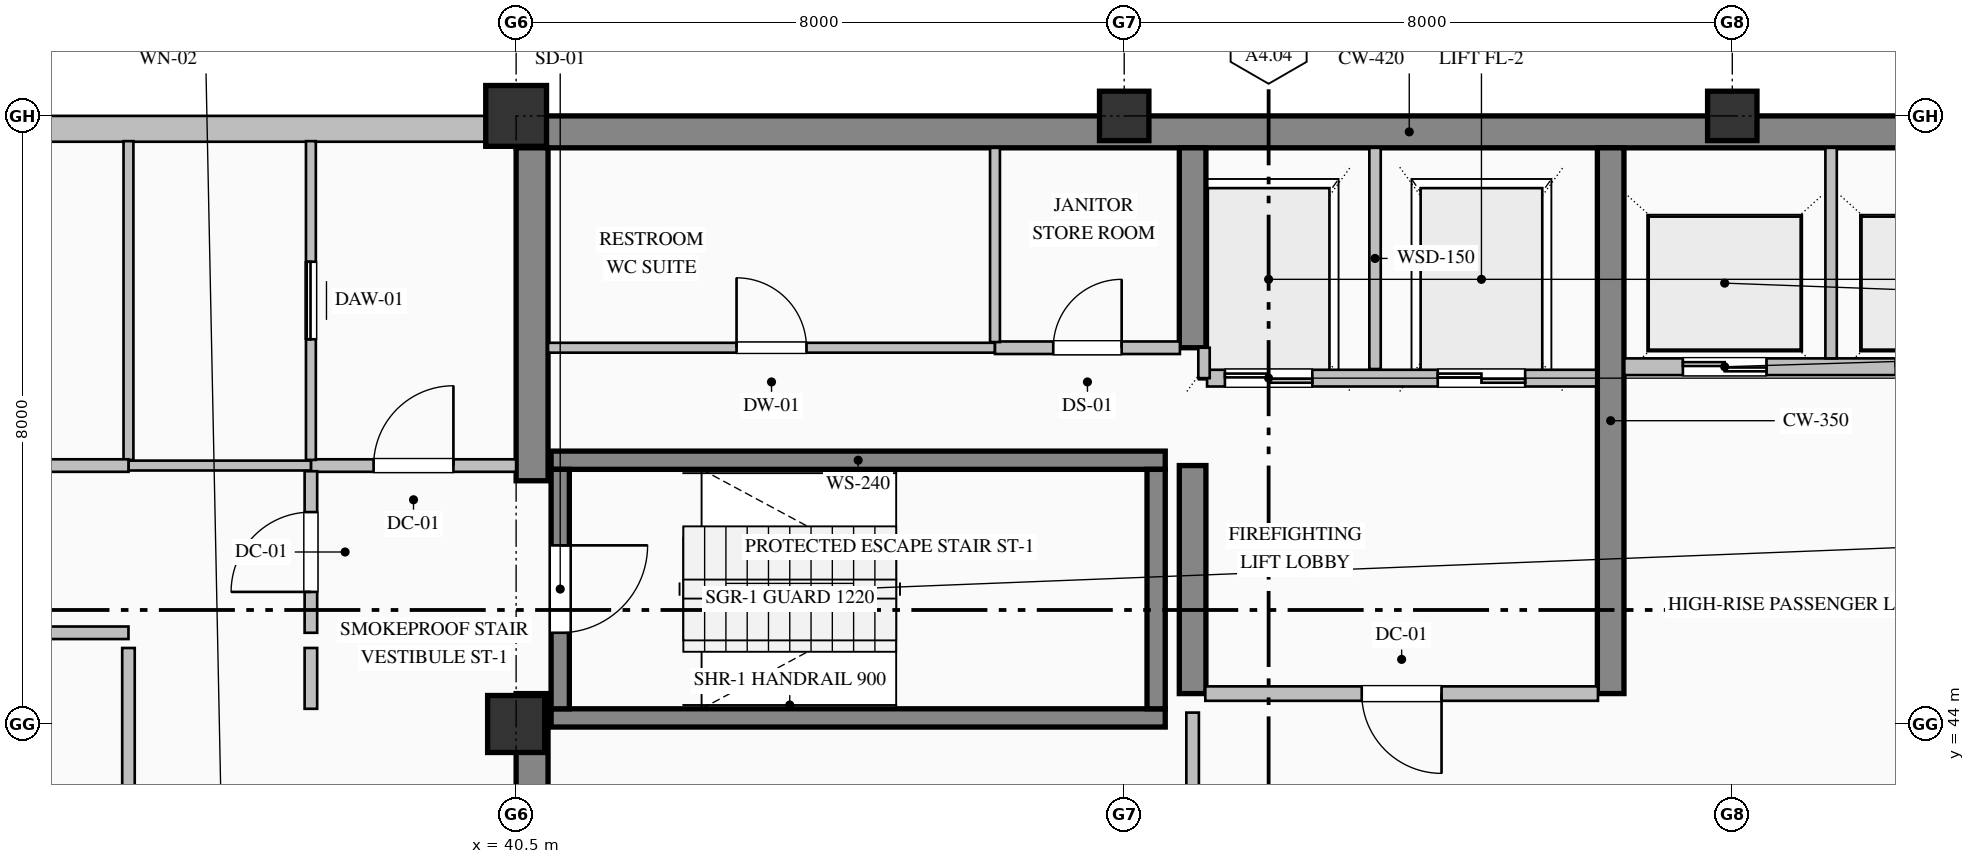
"""IFC4 building model, lengths in metres.
Left out: names, types, materials, properties, quantities, classifications, styles, units other than length and angle.
Written with IfcOpenShell. Run it as: python <this file> out.ifc"""

import sys

from ifc_helpers import new_model, si_unit, direction, frame, frame_2d, origin, origin_2d, place, context, subcontext, project, spatial, rectangle, hollow_rectangle, extrude, element, fill, save


model = new_model("IFC4")
c1 = context("Model", 3, precision=1e-05, world=origin(), true_north=direction((0.0, 1.0)))
c2 = subcontext(c1, "Body", "Model", "MODEL_VIEW")
j1 = project(units=[si_unit("LENGTHUNIT", "METRE"), si_unit("PLANEANGLEUNIT", "RADIAN")], contexts=[c1])
p1 = place(None, origin())
s1 = spatial("IfcSite", under=j1, at=p1, CompositionType="ELEMENT")
p2 = place(p1, origin())
s2 = spatial("IfcBuilding", under=s1, at=p2, CompositionType="ELEMENT")
p3 = place(p2, frame((0.0, 0.0, 339.2)))
s3 = spatial("IfcBuildingStorey", under=s2, at=p3, CompositionType="ELEMENT", Elevation=339.2)
p4 = place(p3, frame((40.5, 51.79, 0.0), z_axis=(0.0, 0.0, 1.0), x_axis=(1.0, 0.0, 0.0)))
e1 = element("IfcWall", 1, at=p4, inside=s3, PredefinedType="SHEAR", context=c2, shape_type="SweptSolid", body=[
    extrude(rectangle(XDim=23.5, YDim=0.42, at=frame_2d((11.75, 0.0))), origin(), (0.0, 0.0, 1.0), 3.785),
])
p5 = place(p3, frame((40.71, 36.42, 0.0), z_axis=(0.0, 0.0, 1.0), x_axis=(0.0, 1.0, 0.0)))
e2 = element("IfcWall", 2, at=p5, inside=s3, PredefinedType="SHEAR", context=c2, shape_type="SweptSolid", body=[
    extrude(rectangle(XDim=7.98, YDim=0.42, at=frame_2d((3.99, 0.0))), origin(), (0.0, 0.0, 1.0), 3.785),
])
p6 = place(p3, frame((40.71, 47.2, 0.0), z_axis=(0.0, 0.0, 1.0), x_axis=(0.0, 1.0, 0.0)))
e3 = element("IfcWall", 3, at=p6, inside=s3, PredefinedType="SHEAR", context=c2, shape_type="SweptSolid", body=[
    extrude(rectangle(XDim=4.38, YDim=0.42, at=frame_2d((2.19, 0.0))), origin(), (0.0, 0.0, 1.0), 3.785),
])
p7 = place(p3, frame((49.4, 44.4, 0.0), z_axis=(0.0, 0.0, 1.0), x_axis=(0.0, 1.0, 0.0)))
e4 = element("IfcWall", 4, at=p7, inside=s3, PredefinedType="SHEAR", context=c2, shape_type="SweptSolid", body=[
    extrude(rectangle(XDim=3.0, YDim=0.35, at=frame_2d((1.5, 0.0))), origin(), (0.0, 0.0, 1.0), 3.785),
])
p8 = place(p3, frame((49.4, 48.95, 0.0), z_axis=(0.0, 0.0, 1.0), x_axis=(0.0, 1.0, 0.0)))
e5 = element("IfcWall", 5, at=p8, inside=s3, PredefinedType="SHEAR", context=c2, shape_type="SweptSolid", body=[
    extrude(rectangle(XDim=2.63, YDim=0.35, at=frame_2d((1.315, 0.0))), origin(), (0.0, 0.0, 1.0), 3.785),
])
p9 = place(p3, frame((54.9, 44.4, 0.0), z_axis=(0.0, 0.0, 1.0), x_axis=(0.0, 1.0, 0.0)))
e6 = element("IfcWall", 6, at=p9, inside=s3, PredefinedType="SHEAR", context=c2, shape_type="SweptSolid", body=[
    extrude(rectangle(XDim=7.18, YDim=0.35, at=frame_2d((3.59, 0.0))), origin(), (0.0, 0.0, 1.0), 3.785),
])
p10 = place(p3, frame((40.5, 44.0, 0.0), z_axis=(0.0, 0.0, 1.0), x_axis=(1.0, 0.0, 0.0)))
e7 = element("IfcColumn", 7, at=p10, inside=s3, PredefinedType="COLUMN", context=c2, shape_type="SweptSolid", body=[
    extrude(rectangle(XDim=0.75, YDim=0.75, at=origin_2d()), origin(), (0.0, 0.0, 1.0), 4.0),
])
p11 = place(p3, frame((40.5, 52.0, 0.0), z_axis=(0.0, 0.0, 1.0), x_axis=(1.0, 0.0, 0.0)))
e8 = element("IfcColumn", 8, at=p11, inside=s3, PredefinedType="COLUMN", context=c2, shape_type="SweptSolid", body=[
    extrude(hollow_rectangle(XDim=0.8, YDim=0.8, WallThickness=0.032, at=origin_2d()), origin(), (0.0, 0.0, 1.0), 4.0),
])
for number, where, z_axis, x_axis in (
    (9, (48.5, 52.0, 0.0), (0.0, 0.0, 1.0), (1.0, 0.0, 0.0)),
    (10, (56.5, 52.0, 0.0), (0.0, 0.0, 1.0), (1.0, 0.0, 0.0)),
):
    element("IfcColumn", number, at=place(p3, frame(where, z_axis=z_axis, x_axis=x_axis)), inside=s3, PredefinedType="COLUMN", context=c2, shape_type="SweptSolid", body=[
        extrude(hollow_rectangle(XDim=0.65, YDim=0.65, WallThickness=0.028, at=origin_2d()), origin(), (0.0, 0.0, 1.0), 4.0),
    ])
p12 = place(p3, frame((20.5, 51.83, 0.0), z_axis=(0.0, 0.0, 1.0), x_axis=(1.0, 0.0, 0.0)))
e11 = element("IfcWall", 11, at=p12, inside=s3, PredefinedType="SOLIDWALL", context=c2, shape_type="SweptSolid", body=[
    extrude(rectangle(XDim=20.02, YDim=0.34, at=frame_2d((10.01, 0.0))), origin(), (0.0, 0.0, 1.0), 3.335),
])
for number, where, z_axis, x_axis in (
    (12, (40.96, 47.47, 0.0), (0.0, 0.0, 1.0), (1.0, 0.0, 0.0)),
    (13, (49.04, 44.08, 0.0), (0.0, 0.0, 1.0), (-1.0, 0.0, 0.0)),
):
    element("IfcWall", number, at=place(p3, frame(where, z_axis=z_axis, x_axis=x_axis)), inside=s3, PredefinedType="SOLIDWALL", context=c2, shape_type="SweptSolid", body=[
        extrude(rectangle(XDim=8.08, YDim=0.24, at=frame_2d((4.04, 0.0))), origin(), (0.0, 0.0, 1.0), 4.0),
    ])
p13 = place(p3, frame((41.08, 47.35, 0.0), z_axis=(0.0, 0.0, 1.0), x_axis=(0.0, -1.0, 0.0)))
e14 = element("IfcWall", 14, at=p13, inside=s3, PredefinedType="SOLIDWALL", context=c2, shape_type="SweptSolid", body=[
    extrude(rectangle(XDim=3.15, YDim=0.24, at=frame_2d((1.575, 0.0))), origin(), (0.0, 0.0, 1.0), 4.0),
])
p14 = place(p13, frame((1.0, 0.0, 0.0)))
e15 = element("IfcOpeningElement", 15, at=p14, cuts=e14, PredefinedType="OPENING", context=c2, shape_type="SweptSolid", body=[
    extrude(rectangle(XDim=1.15, YDim=2.2, at=frame_2d((0.575, 1.1))), frame((0.0, 0.13, 0.0), z_axis=(0.0, -1.0, 0.0), x_axis=(1.0, 0.0, 0.0)), (0.0, 0.0, 1.0), 0.26),
])
p15 = place(p3, frame((48.92, 44.2, 0.0), z_axis=(0.0, 0.0, 1.0), x_axis=(0.0, 1.0, 0.0)))
e16 = element("IfcWall", 16, at=p15, inside=s3, PredefinedType="SOLIDWALL", context=c2, shape_type="SweptSolid", body=[
    extrude(rectangle(XDim=3.15, YDim=0.24, at=frame_2d((1.575, 0.0))), origin(), (0.0, 0.0, 1.0), 4.0),
])
p16 = place(p3, frame((54.71, 48.55, 0.0), z_axis=(0.0, 0.0, 1.0), x_axis=(-1.0, 0.0, 0.0)))
e17 = element("IfcWall", 17, at=p16, inside=s3, PredefinedType="PARTITIONING", context=c2, shape_type="SweptSolid", body=[
    extrude(rectangle(XDim=5.12, YDim=0.22, at=frame_2d((2.56, 0.0))), origin(), (0.0, 0.0, 1.0), 3.785),
])
p17 = place(p16, frame((3.735, 0.0, 0.0)))
e18 = element("IfcOpeningElement", 18, at=p17, cuts=e17, PredefinedType="OPENING", context=c2, shape_type="SweptSolid", body=[
    extrude(rectangle(XDim=1.15, YDim=2.2, at=frame_2d((0.575, 1.1))), frame((0.0, 0.12, 0.0), z_axis=(0.0, -1.0, 0.0), x_axis=(1.0, 0.0, 0.0)), (0.0, 0.0, 1.0), 0.24),
])
p18 = place(p16, frame((0.935, 0.0, 0.0)))
e19 = element("IfcOpeningElement", 19, at=p18, cuts=e17, PredefinedType="OPENING", context=c2, shape_type="SweptSolid", body=[
    extrude(rectangle(XDim=1.15, YDim=2.2, at=frame_2d((0.575, 1.1))), frame((0.0, 0.12, 0.0), z_axis=(0.0, -1.0, 0.0), x_axis=(1.0, 0.0, 0.0)), (0.0, 0.0, 1.0), 0.24),
])
p19 = place(p3, frame((51.8, 48.67, 0.0), z_axis=(0.0, 0.0, 1.0), x_axis=(0.0, 1.0, 0.0)))
e20 = element("IfcWall", 20, at=p19, inside=s3, PredefinedType="PARTITIONING", context=c2, shape_type="SweptSolid", body=[
    extrude(rectangle(XDim=2.91, YDim=0.15, at=frame_2d((1.455, 0.0))), origin(), (0.0, 0.0, 1.0), 3.785),
])
p20 = place(p3, frame((49.55, 48.55, 0.0), z_axis=(0.0, 0.0, 1.0), x_axis=(0.0, 1.0, 0.0)))
e21 = element("IfcWall", 21, at=p20, inside=s3, PredefinedType="PARTITIONING", context=c2, shape_type="SweptSolid", body=[
    extrude(rectangle(XDim=0.4, YDim=0.15, at=frame_2d((0.2, 0.0))), origin(), (0.0, 0.0, 1.0), 3.785),
])
p21 = place(p3, frame((63.32, 48.7, 0.0), z_axis=(0.0, 0.0, 1.0), x_axis=(-1.0, 0.0, 0.0)))
e22 = element("IfcWall", 22, at=p21, inside=s3, PredefinedType="PARTITIONING", context=c2, shape_type="SweptSolid", body=[
    extrude(rectangle(XDim=8.24, YDim=0.22, at=frame_2d((4.12, 0.0))), origin(), (0.0, 0.0, 1.0), 3.785),
])
p22 = place(p21, frame((6.37, 0.0, 0.0)))
e23 = element("IfcOpeningElement", 23, at=p22, cuts=e22, PredefinedType="OPENING", context=c2, shape_type="SweptSolid", body=[
    extrude(rectangle(XDim=1.1, YDim=2.2, at=frame_2d((0.55, 1.1))), frame((0.0, 0.12, 0.0), z_axis=(0.0, -1.0, 0.0), x_axis=(1.0, 0.0, 0.0)), (0.0, 0.0, 1.0), 0.24),
])
p23 = place(p21, frame((3.57, 0.0, 0.0)))
e24 = element("IfcOpeningElement", 24, at=p23, cuts=e22, PredefinedType="OPENING", context=c2, shape_type="SweptSolid", body=[
    extrude(rectangle(XDim=1.1, YDim=2.2, at=frame_2d((0.55, 1.1))), frame((0.0, 0.12, 0.0), z_axis=(0.0, -1.0, 0.0), x_axis=(1.0, 0.0, 0.0)), (0.0, 0.0, 1.0), 0.24),
])
p24 = place(p21, frame((0.77, 0.0, 0.0)))
e25 = element("IfcOpeningElement", 25, at=p24, cuts=e22, PredefinedType="OPENING", context=c2, shape_type="SweptSolid", body=[
    extrude(rectangle(XDim=1.1, YDim=2.2, at=frame_2d((0.55, 1.1))), frame((0.0, 0.12, 0.0), z_axis=(0.0, -1.0, 0.0), x_axis=(1.0, 0.0, 0.0)), (0.0, 0.0, 1.0), 0.24),
])
p25 = place(p3, frame((57.8, 48.81, 0.0), z_axis=(0.0, 0.0, 1.0), x_axis=(0.0, 1.0, 0.0)))
e26 = element("IfcWall", 26, at=p25, inside=s3, PredefinedType="PARTITIONING", context=c2, shape_type="SweptSolid", body=[
    extrude(rectangle(XDim=2.77, YDim=0.15, at=frame_2d((1.385, 0.0))), origin(), (0.0, 0.0, 1.0), 3.785),
])
p26 = place(p3, frame((37.8, 47.4, 0.0), z_axis=(0.0, 0.0, 1.0), x_axis=(1.0, 0.0, 0.0)))
e27 = element("IfcWall", 27, at=p26, inside=s3, PredefinedType="PARTITIONING", context=c2, shape_type="SweptSolid", body=[
    extrude(rectangle(XDim=2.7, YDim=0.165, at=frame_2d((1.35, 0.0))), origin(), (0.0, 0.0, 1.0), 3.785),
])
p27 = place(p26, frame((0.825, 0.0, 0.0)))
e28 = element("IfcOpeningElement", 28, at=p27, cuts=e27, PredefinedType="OPENING", context=c2, shape_type="SweptSolid", body=[
    extrude(rectangle(XDim=1.05, YDim=2.15, at=frame_2d((0.525, 1.075))), frame((0.0, 0.093, 0.0), z_axis=(0.0, -1.0, 0.0), x_axis=(1.0, 0.0, 0.0)), (0.0, 0.0, 1.0), 0.185),
])
p28 = place(p3, frame((37.8, 45.2, 0.0), z_axis=(0.0, 0.0, 1.0), x_axis=(0.0, 1.0, 0.0)))
e29 = element("IfcWall", 29, at=p28, inside=s3, PredefinedType="PARTITIONING", context=c2, shape_type="SweptSolid", body=[
    extrude(rectangle(XDim=2.125, YDim=0.165, at=frame_2d((1.063, 0.0))), origin(), (0.0, 0.0, 1.0), 3.785),
])
p29 = place(p28, frame((0.538, 0.0, 0.0)))
e30 = element("IfcOpeningElement", 30, at=p29, cuts=e29, PredefinedType="OPENING", context=c2, shape_type="SweptSolid", body=[
    extrude(rectangle(XDim=1.05, YDim=2.15, at=frame_2d((0.525, 1.075))), frame((0.0, 0.093, 0.0), z_axis=(0.0, -1.0, 0.0), x_axis=(1.0, 0.0, 0.0)), (0.0, 0.0, 1.0), 0.185),
])
p30 = place(p3, frame((37.8, 44.2, 0.0), z_axis=(0.0, 0.0, 1.0), x_axis=(0.0, 1.0, 0.0)))
e31 = element("IfcWall", 31, at=p30, inside=s3, PredefinedType="PARTITIONING", context=c2, shape_type="SweptSolid", body=[
    extrude(rectangle(XDim=0.8, YDim=0.165, at=frame_2d((0.4, 0.0))), origin(), (0.0, 0.0, 1.0), 3.785),
])
p31 = place(p3, frame((37.8, 47.475, 0.0), z_axis=(0.0, 0.0, 1.0), x_axis=(0.0, 1.0, 0.0)))
e32 = element("IfcWall", 32, at=p31, inside=s3, PredefinedType="PARTITIONING", context=c2, shape_type="SweptSolid", body=[
    extrude(rectangle(XDim=4.193, YDim=0.13, at=frame_2d((2.097, 0.0))), origin(), (0.0, 0.0, 1.0), 3.785),
])
p32 = place(p31, frame((1.587, 0.0, 0.0)))
e33 = element("IfcOpeningElement", 33, at=p32, cuts=e32, PredefinedType="OPENING", context=c2, shape_type="SweptSolid", body=[
    extrude(rectangle(XDim=1.02, YDim=2.15, at=frame_2d((0.51, 1.075))), frame((0.0, 0.075, 0.0), z_axis=(0.0, -1.0, 0.0), x_axis=(1.0, 0.0, 0.0)), (0.0, 0.0, 1.0), 0.15),
])
p33 = place(p3, frame((37.8, 47.4, 0.0), z_axis=(0.0, 0.0, 1.0), x_axis=(-1.0, 0.0, 0.0)))
e34 = element("IfcWall", 34, at=p33, inside=s3, PredefinedType="PARTITIONING", context=c2, shape_type="SweptSolid", body=[
    extrude(rectangle(XDim=2.4, YDim=0.13, at=frame_2d((1.2, 0.0))), origin(), (0.0, 0.0, 1.0), 3.785),
])
p34 = place(p3, frame((35.4, 47.475, 0.0), z_axis=(0.0, 0.0, 1.0), x_axis=(0.0, 1.0, 0.0)))
e35 = element("IfcWall", 35, at=p34, inside=s3, PredefinedType="PARTITIONING", context=c2, shape_type="SweptSolid", body=[
    extrude(rectangle(XDim=4.193, YDim=0.13, at=frame_2d((2.097, 0.0))), origin(), (0.0, 0.0, 1.0), 3.785),
])
p35 = place(p3, frame((40.92, 48.95, 0.0), z_axis=(0.0, 0.0, 1.0), x_axis=(1.0, 0.0, 0.0)))
e36 = element("IfcWall", 36, at=p35, inside=s3, PredefinedType="PARTITIONING", context=c2, shape_type="SweptSolid", body=[
    extrude(rectangle(XDim=5.88, YDim=0.13, at=frame_2d((2.94, 0.0))), origin(), (0.0, 0.0, 1.0), 3.785),
])
p36 = place(p35, frame((2.48, 0.0, 0.0)))
e37 = element("IfcOpeningElement", 37, at=p36, cuts=e36, PredefinedType="OPENING", context=c2, shape_type="SweptSolid", body=[
    extrude(rectangle(XDim=0.92, YDim=2.15, at=frame_2d((0.46, 1.075))), frame((0.0, 0.075, 0.0), z_axis=(0.0, -1.0, 0.0), x_axis=(1.0, 0.0, 0.0)), (0.0, 0.0, 1.0), 0.15),
])
p37 = place(p3, frame((46.8, 48.95, 0.0), z_axis=(0.0, 0.0, 1.0), x_axis=(1.0, 0.0, 0.0)))
e38 = element("IfcWall", 38, at=p37, inside=s3, PredefinedType="PARTITIONING", context=c2, shape_type="SweptSolid", body=[
    extrude(rectangle(XDim=2.433, YDim=0.165, at=frame_2d((1.216, 0.0))), origin(), (0.0, 0.0, 1.0), 3.785),
])
p38 = place(p37, frame((0.767, 0.0, 0.0)))
e39 = element("IfcOpeningElement", 39, at=p38, cuts=e38, PredefinedType="OPENING", context=c2, shape_type="SweptSolid", body=[
    extrude(rectangle(XDim=0.9, YDim=2.15, at=frame_2d((0.45, 1.075))), frame((0.0, 0.093, 0.0), z_axis=(0.0, -1.0, 0.0), x_axis=(1.0, 0.0, 0.0)), (0.0, 0.0, 1.0), 0.185),
])
p39 = place(p3, frame((54.733, 44.4, 0.0), z_axis=(0.0, 0.0, 1.0), x_axis=(-1.0, 0.0, 0.0)))
e40 = element("IfcWall", 40, at=p39, inside=s3, PredefinedType="PARTITIONING", context=c2, shape_type="SweptSolid", body=[
    extrude(rectangle(XDim=5.166, YDim=0.19, at=frame_2d((2.583, 0.0))), origin(), (0.0, 0.0, 1.0), 3.785),
])
p40 = place(p39, frame((2.058, 0.0, 0.0)))
e41 = element("IfcOpeningElement", 41, at=p40, cuts=e40, PredefinedType="OPENING", context=c2, shape_type="SweptSolid", body=[
    extrude(rectangle(XDim=1.05, YDim=2.15, at=frame_2d((0.525, 1.075))), frame((0.0, 0.105, 0.0), z_axis=(0.0, -1.0, 0.0), x_axis=(1.0, 0.0, 0.0)), (0.0, 0.0, 1.0), 0.21),
])
p41 = place(p3, frame((49.4, 36.42, 0.0), z_axis=(0.0, 0.0, 1.0), x_axis=(0.0, 1.0, 0.0)))
e42 = element("IfcWall", 42, at=p41, inside=s3, PredefinedType="PARTITIONING", context=c2, shape_type="SweptSolid", body=[
    extrude(rectangle(XDim=7.73, YDim=0.165, at=frame_2d((3.865, 0.0))), origin(), (0.0, 0.0, 1.0), 3.027),
])
p42 = place(p41, frame((3.365, 0.0, 0.0)))
e43 = element("IfcOpeningElement", 43, at=p42, cuts=e42, PredefinedType="OPENING", context=c2, shape_type="SweptSolid", body=[
    extrude(rectangle(XDim=1.0, YDim=2.15, at=frame_2d((0.5, 1.075))), frame((0.0, 0.093, 0.0), z_axis=(0.0, -1.0, 0.0), x_axis=(1.0, 0.0, 0.0)), (0.0, 0.0, 1.0), 0.185),
])
p43 = place(p3, frame((46.8, 51.58, 0.0), z_axis=(0.0, 0.0, 1.0), x_axis=(0.0, -1.0, 0.0)))
e44 = element("IfcWall", 44, at=p43, inside=s3, PredefinedType="PARTITIONING", context=c2, shape_type="SweptSolid", body=[
    extrude(rectangle(XDim=2.556, YDim=0.13, at=frame_2d((1.278, 0.0))), origin(), (0.0, 0.0, 1.0), 3.785),
])
p44 = place(p3, frame((27.5, 47.4, 0.0), z_axis=(0.0, 0.0, 1.0), x_axis=(1.0, 0.0, 0.0)))
e45 = element("IfcWall", 45, at=p44, inside=s3, PredefinedType="PARTITIONING", context=c2, shape_type="SweptSolid", body=[
    extrude(rectangle(XDim=7.9, YDim=0.165, at=frame_2d((3.95, 0.0))), origin(), (0.0, 0.0, 1.0), 3.785),
])
p45 = place(p44, frame((3.45, 0.0, 0.0)))
e46 = element("IfcOpeningElement", 46, at=p45, cuts=e45, PredefinedType="OPENING", context=c2, shape_type="SweptSolid", body=[
    extrude(rectangle(XDim=1.0, YDim=2.15, at=frame_2d((0.5, 1.075))), frame((0.0, 0.093, 0.0), z_axis=(0.0, -1.0, 0.0), x_axis=(1.0, 0.0, 0.0)), (0.0, 0.0, 1.0), 0.185),
])
p46 = place(p3, frame((35.4, 45.2, 0.0), z_axis=(0.0, 0.0, 1.0), x_axis=(-1.0, 0.0, 0.0)))
e47 = element("IfcWall", 47, at=p46, inside=s3, PredefinedType="PARTITIONING", context=c2, shape_type="SweptSolid", body=[
    extrude(rectangle(XDim=9.4, YDim=0.165, at=frame_2d((4.7, 0.0))), origin(), (0.0, 0.0, 1.0), 3.785),
])
p47 = place(p46, frame((4.2, 0.0, 0.0)))
e48 = element("IfcOpeningElement", 48, at=p47, cuts=e47, PredefinedType="OPENING", context=c2, shape_type="SweptSolid", body=[
    extrude(rectangle(XDim=1.0, YDim=2.15, at=frame_2d((0.5, 1.075))), frame((0.0, 0.093, 0.0), z_axis=(0.0, -1.0, 0.0), x_axis=(1.0, 0.0, 0.0)), (0.0, 0.0, 1.0), 0.185),
])
p48 = place(p3, frame((35.4, 40.057, 0.0), z_axis=(0.0, 0.0, 1.0), x_axis=(0.0, 1.0, 0.0)))
e49 = element("IfcWall", 49, at=p48, inside=s3, PredefinedType="PARTITIONING", context=c2, shape_type="SweptSolid", body=[
    extrude(rectangle(XDim=4.943, YDim=0.165, at=frame_2d((2.472, 0.0))), origin(), (0.0, 0.0, 1.0), 3.785),
])
p49 = place(p14, origin())
e50 = element("IfcDoor", 50, at=p49, inside=s3, OperationType="SINGLE_SWING_LEFT", PredefinedType="DOOR", context=c2, shape_type="SweptSolid", body=[
    extrude(rectangle(XDim=1.15, YDim=2.2, at=frame_2d((0.575, 1.1))), frame((0.0, 0.025, 0.0), z_axis=(0.0, -1.0, 0.0), x_axis=(1.0, 0.0, 0.0)), (0.0, 0.0, 1.0), 0.05),
])
fill(e15, e50)
p50 = place(p17, origin())
e51 = element("IfcDoor", 51, at=p50, inside=s3, OperationType="DOUBLE_DOOR_SLIDING", PredefinedType="DOOR", context=c2, shape_type="SweptSolid", body=[
    extrude(rectangle(XDim=1.15, YDim=2.2, at=frame_2d((0.575, 1.1))), frame((0.0, 0.025, 0.0), z_axis=(0.0, -1.0, 0.0), x_axis=(1.0, 0.0, 0.0)), (0.0, 0.0, 1.0), 0.05),
])
fill(e18, e51)
p51 = place(p18, origin())
e52 = element("IfcDoor", 52, at=p51, inside=s3, OperationType="DOUBLE_DOOR_SLIDING", PredefinedType="DOOR", context=c2, shape_type="SweptSolid", body=[
    extrude(rectangle(XDim=1.15, YDim=2.2, at=frame_2d((0.575, 1.1))), frame((0.0, 0.025, 0.0), z_axis=(0.0, -1.0, 0.0), x_axis=(1.0, 0.0, 0.0)), (0.0, 0.0, 1.0), 0.05),
])
fill(e19, e52)
p52 = place(p22, origin())
e53 = element("IfcDoor", 53, at=p52, inside=s3, OperationType="DOUBLE_DOOR_SLIDING", PredefinedType="DOOR", context=c2, shape_type="SweptSolid", body=[
    extrude(rectangle(XDim=1.1, YDim=2.2, at=frame_2d((0.55, 1.1))), frame((0.0, 0.025, 0.0), z_axis=(0.0, -1.0, 0.0), x_axis=(1.0, 0.0, 0.0)), (0.0, 0.0, 1.0), 0.05),
])
fill(e23, e53)
p53 = place(p40, origin())
e54 = element("IfcDoor", 54, at=p53, inside=s3, OperationType="SINGLE_SWING_LEFT", PredefinedType="DOOR", context=c2, shape_type="SweptSolid", body=[
    extrude(rectangle(XDim=1.05, YDim=2.15, at=frame_2d((0.525, 1.075))), frame((0.0, 0.025, 0.0), z_axis=(0.0, -1.0, 0.0), x_axis=(1.0, 0.0, 0.0)), (0.0, 0.0, 1.0), 0.05),
])
fill(e41, e54)
p54 = place(p27, origin())
e55 = element("IfcDoor", 55, at=p54, inside=s3, OperationType="SINGLE_SWING_RIGHT", PredefinedType="DOOR", context=c2, shape_type="SweptSolid", body=[
    extrude(rectangle(XDim=1.05, YDim=2.15, at=frame_2d((0.525, 1.075))), frame((0.0, 0.025, 0.0), z_axis=(0.0, -1.0, 0.0), x_axis=(1.0, 0.0, 0.0)), (0.0, 0.0, 1.0), 0.05),
])
fill(e28, e55)
p55 = place(p29, origin())
e56 = element("IfcDoor", 56, at=p55, inside=s3, OperationType="SINGLE_SWING_LEFT", PredefinedType="DOOR", context=c2, shape_type="SweptSolid", body=[
    extrude(rectangle(XDim=1.05, YDim=2.15, at=frame_2d((0.525, 1.075))), frame((0.0, 0.025, 0.0), z_axis=(0.0, -1.0, 0.0), x_axis=(1.0, 0.0, 0.0)), (0.0, 0.0, 1.0), 0.05),
])
fill(e30, e56)
p56 = place(p32, origin())
e57 = element("IfcDoor", 57, at=p56, inside=s3, OperationType="SLIDING_TO_LEFT", PredefinedType="DOOR", context=c2, shape_type="SweptSolid", body=[
    extrude(rectangle(XDim=1.02, YDim=2.15, at=frame_2d((0.51, 1.075))), frame((0.0, 0.025, 0.0), z_axis=(0.0, -1.0, 0.0), x_axis=(1.0, 0.0, 0.0)), (0.0, 0.0, 1.0), 0.05),
])
fill(e33, e57)
p57 = place(p36, origin())
e58 = element("IfcDoor", 58, at=p57, inside=s3, OperationType="SINGLE_SWING_LEFT", PredefinedType="DOOR", context=c2, shape_type="SweptSolid", body=[
    extrude(rectangle(XDim=0.92, YDim=2.15, at=frame_2d((0.46, 1.075))), frame((0.0, 0.025, 0.0), z_axis=(0.0, -1.0, 0.0), x_axis=(1.0, 0.0, 0.0)), (0.0, 0.0, 1.0), 0.05),
])
fill(e37, e58)
p58 = place(p38, origin())
e59 = element("IfcDoor", 59, at=p58, inside=s3, OperationType="SINGLE_SWING_RIGHT", PredefinedType="DOOR", context=c2, shape_type="SweptSolid", body=[
    extrude(rectangle(XDim=0.9, YDim=2.15, at=frame_2d((0.45, 1.075))), frame((0.0, 0.025, 0.0), z_axis=(0.0, -1.0, 0.0), x_axis=(1.0, 0.0, 0.0)), (0.0, 0.0, 1.0), 0.05),
])
fill(e39, e59)
save(model, sys.argv[1])
